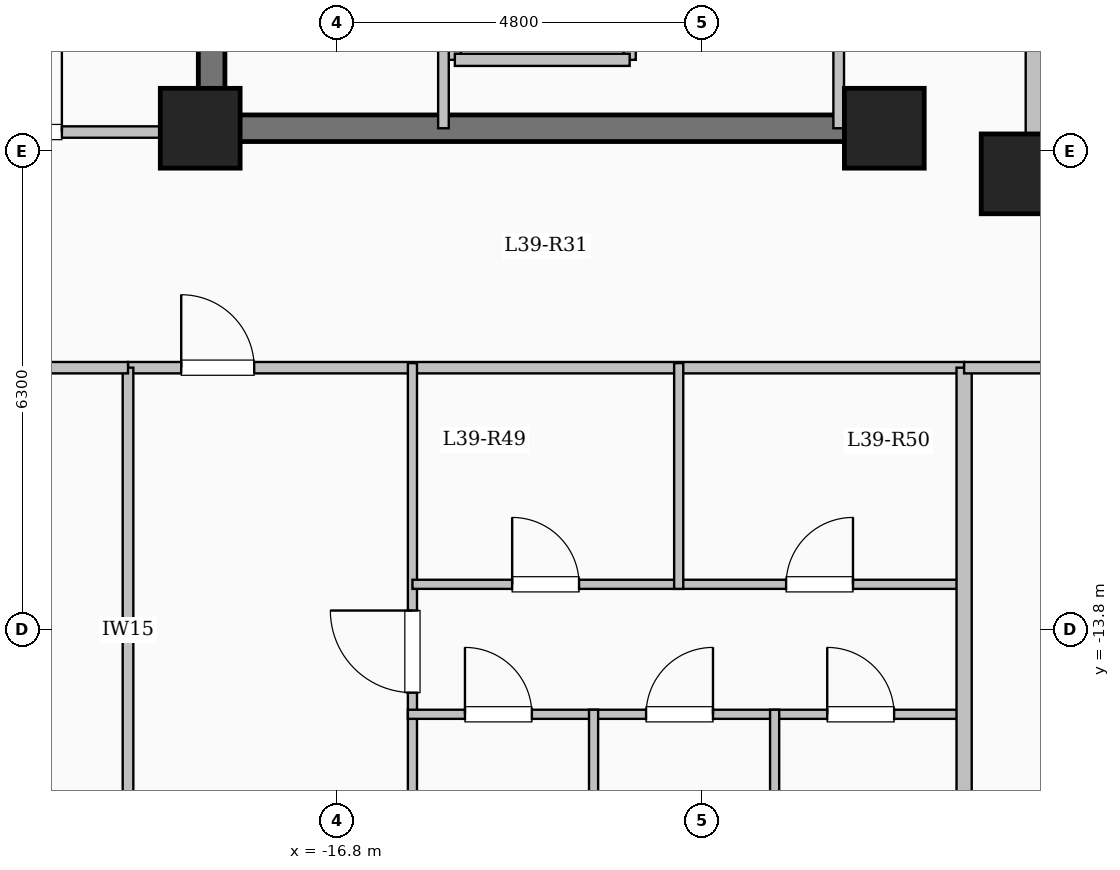
"""IFC4 building model, lengths in metres.
Left out: names, types, materials, properties, quantities, classifications, styles, units other than length and angle.
Written with IfcOpenShell. Run it as: python <this file> out.ifc"""

import sys

from ifc_helpers import new_model, si_unit, direction, frame, frame_2d, origin, origin_2d, place, context, subcontext, project, spatial, rectangle, extrude, element, fill, save


model = new_model("IFC4")
c1 = context("Model", 3, precision=1e-05, world=origin(), true_north=direction((0.0, 1.0)))
c2 = subcontext(c1, "Body", "Model", "MODEL_VIEW")
j1 = project(units=[si_unit("LENGTHUNIT", "METRE"), si_unit("PLANEANGLEUNIT", "RADIAN")], contexts=[c1])
p1 = place(None, origin())
s1 = spatial("IfcSite", under=j1, at=p1, CompositionType="ELEMENT")
p2 = place(p1, origin())
s2 = spatial("IfcBuilding", under=s1, at=p2, CompositionType="ELEMENT")
p3 = place(p2, frame((0.0, 0.0, 146.0)))
s3 = spatial("IfcBuildingStorey", under=s2, at=p3, CompositionType="ELEMENT", Elevation=146.0)
for number, where, z_axis, x_axis in (
    (1, (-7.8, -7.8, 0.0), (0.0, 0.0, 1.0), (1.0, 0.0, 0.0)),
    (2, (-9.6, -7.2, 0.0), (0.0, 0.0, 1.0), (1.0, 0.0, 0.0)),
    (3, (-18.6, -7.2, 0.0), (0.0, 0.0, 1.0), (1.0, 0.0, 0.0)),
):
    element("IfcColumn", number, at=place(p3, frame(where, z_axis=z_axis, x_axis=x_axis)), inside=s3, PredefinedType="COLUMN", context=c2, shape_type="SweptSolid", body=[
        extrude(rectangle(XDim=1.05, YDim=1.05, at=origin_2d()), origin(), (0.0, 0.0, 1.0), 3.35),
    ])
p4 = place(p3, frame((-7.62, -7.62, 0.0), z_axis=(0.0, 0.0, 1.0), x_axis=(1.0, 0.0, 0.0)))
e4 = element("IfcWall", 4, at=p4, inside=s3, PredefinedType="SOLIDWALL", context=c2, shape_type="SweptSolid", body=[
    extrude(rectangle(XDim=15.24, YDim=0.24, at=frame_2d((7.62, 0.0))), origin(), (0.0, 0.0, 1.0), 3.1),
])
p5 = place(p4, frame((6.92, 0.0, 0.95)))
e5 = element("IfcOpeningElement", 5, at=p5, cuts=e4, PredefinedType="OPENING", context=c2, shape_type="SweptSolid", body=[
    extrude(rectangle(XDim=1.4, YDim=1.5, at=frame_2d((0.7, 0.75))), frame((0.0, 0.13, 0.0), z_axis=(0.0, -1.0, 0.0), x_axis=(1.0, 0.0, 0.0)), (0.0, 0.0, 1.0), 0.26),
])
p6 = place(p3, frame((-7.62, 7.62, 0.0), z_axis=(0.0, 0.0, 1.0), x_axis=(0.0, -1.0, 0.0)))
e6 = element("IfcWall", 6, at=p6, inside=s3, PredefinedType="SOLIDWALL", context=c2, shape_type="SweptSolid", body=[
    extrude(rectangle(XDim=15.24, YDim=0.24, at=frame_2d((7.62, 0.0))), origin(), (0.0, 0.0, 1.0), 3.1),
])
p7 = place(p6, frame((6.92, 0.0, 0.95)))
e7 = element("IfcOpeningElement", 7, at=p7, cuts=e6, PredefinedType="OPENING", context=c2, shape_type="SweptSolid", body=[
    extrude(rectangle(XDim=1.4, YDim=1.5, at=frame_2d((0.7, 0.75))), frame((0.0, 0.13, 0.0), z_axis=(0.0, -1.0, 0.0), x_axis=(1.0, 0.0, 0.0)), (0.0, 0.0, 1.0), 0.26),
])
for number, where, z_axis, x_axis in (
    (8, (-15.25, -6.3, 0.0), (0.0, 0.0, 1.0), (0.0, 1.0, 0.0)),
    (9, (-12.95, -6.3, 0.0), (0.0, 0.0, 1.0), (0.0, 1.0, 0.0)),
):
    element("IfcWall", number, at=place(p3, frame(where, z_axis=z_axis, x_axis=x_axis)), inside=s3, PredefinedType="SOLIDWALL", context=c2, shape_type="SweptSolid", body=[
        extrude(rectangle(XDim=2.6, YDim=0.16, at=frame_2d((1.3, 0.0))), origin(), (0.0, 0.0, 1.0), 3.1),
    ])
p8 = place(p3, frame((-15.25, -6.3, 0.0), z_axis=(0.0, 0.0, 1.0), x_axis=(1.0, 0.0, 0.0)))
e10 = element("IfcWall", 10, at=p8, inside=s3, PredefinedType="SOLIDWALL", context=c2, shape_type="SweptSolid", body=[
    extrude(rectangle(XDim=2.3, YDim=0.16, at=frame_2d((1.15, 0.0))), origin(), (0.0, 0.0, 1.0), 3.1),
])
p9 = place(p3, frame((-18.45, -7.375, 0.0), z_axis=(0.0, 0.0, 1.0), x_axis=(0.0, 1.0, 0.0)))
e11 = element("IfcWall", 11, at=p9, inside=s3, PredefinedType="SHEAR", context=c2, shape_type="SweptSolid", body=[
    extrude(rectangle(XDim=14.05, YDim=0.35, at=frame_2d((7.025, 0.0))), origin(), (0.0, 0.0, 1.0), 3.35),
])
p10 = place(p3, frame((-18.625, -7.2, 0.0), z_axis=(0.0, 0.0, 1.0), x_axis=(1.0, 0.0, 0.0)))
e12 = element("IfcWall", 12, at=p10, inside=s3, PredefinedType="SHEAR", context=c2, shape_type="SweptSolid", body=[
    extrude(rectangle(XDim=8.55, YDim=0.35, at=frame_2d((4.275, 0.0))), origin(), (0.0, 0.0, 1.0), 3.35),
])
p11 = place(p3, frame((-15.4, -7.2, 0.0), z_axis=(0.0, 0.0, 1.0), x_axis=(0.0, 1.0, 0.0)))
e13 = element("IfcWall", 13, at=p11, inside=s3, PredefinedType="PARTITIONING", context=c2, shape_type="SweptSolid", body=[
    extrude(rectangle(XDim=10.45, YDim=0.14, at=frame_2d((5.225, 0.0))), origin(), (0.0, 0.0, 1.0), 3.1),
])
p12 = place(p11, frame((9.25, 0.0, 0.0)))
e14 = element("IfcOpeningElement", 14, at=p12, cuts=e13, PredefinedType="OPENING", context=c2, shape_type="SweptSolid", body=[
    extrude(rectangle(XDim=0.9, YDim=2.08, at=frame_2d((0.45, 1.04))), frame((0.0, 0.08, 0.0), z_axis=(0.0, -1.0, 0.0), x_axis=(1.0, 0.0, 0.0)), (0.0, 0.0, 1.0), 0.16),
])
p13 = place(p3, frame((-10.2, -7.2, 0.0), z_axis=(0.0, 0.0, 1.0), x_axis=(0.0, 1.0, 0.0)))
e15 = element("IfcWall", 15, at=p13, inside=s3, PredefinedType="PARTITIONING", context=c2, shape_type="SweptSolid", body=[
    extrude(rectangle(XDim=9.12, YDim=0.14, at=frame_2d((4.56, 0.0))), origin(), (0.0, 0.0, 1.0), 3.1),
])
p14 = place(p13, frame((1.9, 0.0, 0.0)))
e16 = element("IfcOpeningElement", 16, at=p14, cuts=e15, PredefinedType="OPENING", context=c2, shape_type="SweptSolid", body=[
    extrude(rectangle(XDim=0.95, YDim=2.12, at=frame_2d((0.475, 1.06))), frame((0.0, 0.08, 0.0), z_axis=(0.0, -1.0, 0.0), x_axis=(1.0, 0.0, 0.0)), (0.0, 0.0, 1.0), 0.16),
])
p15 = place(p13, frame((6.6, 0.0, 0.0)))
e17 = element("IfcOpeningElement", 17, at=p15, cuts=e15, PredefinedType="OPENING", context=c2, shape_type="SweptSolid", body=[
    extrude(rectangle(XDim=0.95, YDim=2.12, at=frame_2d((0.475, 1.06))), frame((0.0, 0.08, 0.0), z_axis=(0.0, -1.0, 0.0), x_axis=(1.0, 0.0, 0.0)), (0.0, 0.0, 1.0), 0.16),
])
p16 = place(p3, frame((-19.55, -10.35, 0.0), z_axis=(0.0, 0.0, 1.0), x_axis=(1.0, 0.0, 0.0)))
e18 = element("IfcWall", 18, at=p16, inside=s3, PredefinedType="PARTITIONING", context=c2, shape_type="SweptSolid", body=[
    extrude(rectangle(XDim=11.0, YDim=0.15, at=frame_2d((5.5, 0.0))), origin(), (0.0, 0.0, 1.0), 3.1),
])
p17 = place(p16, frame((0.7, 0.0, 0.0)))
e19 = element("IfcOpeningElement", 19, at=p17, cuts=e18, PredefinedType="OPENING", context=c2, shape_type="SweptSolid", body=[
    extrude(rectangle(XDim=0.96, YDim=2.15, at=frame_2d((0.48, 1.075))), frame((0.0, 0.085, 0.0), z_axis=(0.0, -1.0, 0.0), x_axis=(1.0, 0.0, 0.0)), (0.0, 0.0, 1.0), 0.17),
])
p18 = place(p3, frame((-15.808, -21.2, 0.0), z_axis=(0.0, 0.0, 1.0), x_axis=(0.0, 1.0, 0.0)))
e20 = element("IfcWall", 20, at=p18, inside=s3, PredefinedType="PARTITIONING", context=c2, shape_type="SweptSolid", body=[
    extrude(rectangle(XDim=10.91, YDim=0.12, at=frame_2d((5.455, 0.0))), origin(), (0.0, 0.0, 1.0), 3.1),
])
p19 = place(p18, frame((6.575, 0.0, 0.0)))
e21 = element("IfcOpeningElement", 21, at=p19, cuts=e20, PredefinedType="OPENING", context=c2, shape_type="SweptSolid", body=[
    extrude(rectangle(XDim=1.08, YDim=2.15, at=frame_2d((0.54, 1.075))), frame((0.0, 0.07, 0.0), z_axis=(0.0, -1.0, 0.0), x_axis=(1.0, 0.0, 0.0)), (0.0, 0.0, 1.0), 0.14),
])
p20 = place(p3, frame((-15.808, -13.2, 0.0), z_axis=(0.0, 0.0, 1.0), x_axis=(1.0, 0.0, 0.0)))
e22 = element("IfcWall", 22, at=p20, inside=s3, PredefinedType="PARTITIONING", context=c2, shape_type="SweptSolid", body=[
    extrude(rectangle(XDim=3.503, YDim=0.12, at=frame_2d((1.751, 0.0))), origin(), (0.0, 0.0, 1.0), 3.1),
])
p21 = place(p20, frame((1.312, 0.0, 0.0)))
e23 = element("IfcOpeningElement", 23, at=p21, cuts=e22, PredefinedType="OPENING", context=c2, shape_type="SweptSolid", body=[
    extrude(rectangle(XDim=0.88, YDim=2.1, at=frame_2d((0.44, 1.05))), frame((0.0, 0.07, 0.0), z_axis=(0.0, -1.0, 0.0), x_axis=(1.0, 0.0, 0.0)), (0.0, 0.0, 1.0), 0.14),
])
p22 = place(p3, frame((-12.305, -13.2, 0.0), z_axis=(0.0, 0.0, 1.0), x_axis=(1.0, 0.0, 0.0)))
e24 = element("IfcWall", 24, at=p22, inside=s3, PredefinedType="PARTITIONING", context=c2, shape_type="SweptSolid", body=[
    extrude(rectangle(XDim=3.705, YDim=0.12, at=frame_2d((1.853, 0.0))), origin(), (0.0, 0.0, 1.0), 3.1),
])
p23 = place(p22, frame((1.413, 0.0, 0.0)))
e25 = element("IfcOpeningElement", 25, at=p23, cuts=e24, PredefinedType="OPENING", context=c2, shape_type="SweptSolid", body=[
    extrude(rectangle(XDim=0.88, YDim=2.1, at=frame_2d((0.44, 1.05))), frame((0.0, 0.07, 0.0), z_axis=(0.0, -1.0, 0.0), x_axis=(1.0, 0.0, 0.0)), (0.0, 0.0, 1.0), 0.14),
])
p24 = place(p3, frame((-15.868, -14.91, 0.0), z_axis=(0.0, 0.0, 1.0), x_axis=(1.0, 0.0, 0.0)))
e26 = element("IfcWall", 26, at=p24, inside=s3, PredefinedType="PARTITIONING", context=c2, shape_type="SweptSolid", body=[
    extrude(rectangle(XDim=7.328, YDim=0.12, at=frame_2d((3.664, 0.0))), origin(), (0.0, 0.0, 1.0), 3.1),
])
p25 = place(p24, frame((0.751, 0.0, 0.0)))
e27 = element("IfcOpeningElement", 27, at=p25, cuts=e26, PredefinedType="OPENING", context=c2, shape_type="SweptSolid", body=[
    extrude(rectangle(XDim=0.88, YDim=2.1, at=frame_2d((0.44, 1.05))), frame((0.0, 0.07, 0.0), z_axis=(0.0, -1.0, 0.0), x_axis=(1.0, 0.0, 0.0)), (0.0, 0.0, 1.0), 0.14),
])
p26 = place(p24, frame((3.134, 0.0, 0.0)))
e28 = element("IfcOpeningElement", 28, at=p26, cuts=e26, PredefinedType="OPENING", context=c2, shape_type="SweptSolid", body=[
    extrude(rectangle(XDim=0.88, YDim=2.1, at=frame_2d((0.44, 1.05))), frame((0.0, 0.07, 0.0), z_axis=(0.0, -1.0, 0.0), x_axis=(1.0, 0.0, 0.0)), (0.0, 0.0, 1.0), 0.14),
])
p27 = place(p24, frame((5.517, 0.0, 0.0)))
e29 = element("IfcOpeningElement", 29, at=p27, cuts=e26, PredefinedType="OPENING", context=c2, shape_type="SweptSolid", body=[
    extrude(rectangle(XDim=0.88, YDim=2.1, at=frame_2d((0.44, 1.05))), frame((0.0, 0.07, 0.0), z_axis=(0.0, -1.0, 0.0), x_axis=(1.0, 0.0, 0.0)), (0.0, 0.0, 1.0), 0.14),
])
p28 = place(p3, frame((-12.305, -13.26, 0.0), z_axis=(0.0, 0.0, 1.0), x_axis=(0.0, 1.0, 0.0)))
e30 = element("IfcWall", 30, at=p28, inside=s3, PredefinedType="PARTITIONING", context=c2, shape_type="SweptSolid", body=[
    extrude(rectangle(XDim=2.97, YDim=0.12, at=frame_2d((1.485, 0.0))), origin(), (0.0, 0.0, 1.0), 3.1),
])
for number, where, z_axis, x_axis in (
    (31, (-13.425, -21.2, 0.0), (0.0, 0.0, 1.0), (0.0, 1.0, 0.0)),
    (32, (-11.043, -21.2, 0.0), (0.0, 0.0, 1.0), (0.0, 1.0, 0.0)),
):
    element("IfcWall", number, at=place(p3, frame(where, z_axis=z_axis, x_axis=x_axis)), inside=s3, PredefinedType="PARTITIONING", context=c2, shape_type="SweptSolid", body=[
        extrude(rectangle(XDim=6.35, YDim=0.12, at=frame_2d((3.175, 0.0))), origin(), (0.0, 0.0, 1.0), 3.1),
    ])
p29 = place(p3, frame((-8.55, -21.804, 0.0), z_axis=(0.0, 0.0, 1.0), x_axis=(0.0, 1.0, 0.0)))
e33 = element("IfcWall", 33, at=p29, inside=s3, PredefinedType="SOLIDWALL", context=c2, shape_type="SweptSolid", body=[
    extrude(rectangle(XDim=11.454, YDim=0.2, at=frame_2d((5.727, 0.0))), origin(), (0.0, 0.0, 1.0), 3.1),
])
p30 = place(p3, frame((-8.55, -10.35, 0.0), z_axis=(0.0, 0.0, 1.0), x_axis=(1.0, 0.0, 0.0)))
e34 = element("IfcWall", 34, at=p30, inside=s3, PredefinedType="PARTITIONING", context=c2, shape_type="SweptSolid", body=[
    extrude(rectangle(XDim=17.1, YDim=0.15, at=frame_2d((8.55, 0.0))), origin(), (0.0, 0.0, 1.0), 3.1),
])
p31 = place(p30, frame((1.6, 0.0, 0.0)))
e35 = element("IfcOpeningElement", 35, at=p31, cuts=e34, PredefinedType="OPENING", context=c2, shape_type="SweptSolid", body=[
    extrude(rectangle(XDim=0.96, YDim=2.15, at=frame_2d((0.48, 1.075))), frame((0.0, 0.085, 0.0), z_axis=(0.0, -1.0, 0.0), x_axis=(1.0, 0.0, 0.0)), (0.0, 0.0, 1.0), 0.17),
])
p32 = place(p3, frame((-25.08, -7.25, 0.0), z_axis=(0.0, 0.0, 1.0), x_axis=(1.0, 0.0, 0.0)))
e36 = element("IfcWall", 36, at=p32, inside=s3, PredefinedType="PARTITIONING", context=c2, shape_type="SweptSolid", body=[
    extrude(rectangle(XDim=6.63, YDim=0.15, at=frame_2d((3.315, 0.0))), origin(), (0.0, 0.0, 1.0), 3.1),
])
p33 = place(p32, frame((3.58, 0.0, 0.0)))
e37 = element("IfcOpeningElement", 37, at=p33, cuts=e36, PredefinedType="OPENING", context=c2, shape_type="SweptSolid", body=[
    extrude(rectangle(XDim=1.08, YDim=2.15, at=frame_2d((0.54, 1.075))), frame((0.0, 0.085, 0.0), z_axis=(0.0, -1.0, 0.0), x_axis=(1.0, 0.0, 0.0)), (0.0, 0.0, 1.0), 0.17),
])
p34 = place(p3, frame((-19.55, -17.25, 0.0), z_axis=(0.0, 0.0, 1.0), x_axis=(0.0, 1.0, 0.0)))
e38 = element("IfcWall", 38, at=p34, inside=s3, PredefinedType="PARTITIONING", context=c2, shape_type="SweptSolid", body=[
    extrude(rectangle(XDim=6.9, YDim=0.14, at=frame_2d((3.45, 0.0))), origin(), (0.0, 0.0, 1.0), 3.1),
])
p35 = place(p3, frame((-25.08, -10.35, 0.0), z_axis=(0.0, 0.0, 1.0), x_axis=(1.0, 0.0, 0.0)))
e39 = element("IfcWall", 39, at=p35, inside=s3, PredefinedType="PARTITIONING", context=c2, shape_type="SweptSolid", body=[
    extrude(rectangle(XDim=5.53, YDim=0.15, at=frame_2d((2.765, 0.0))), origin(), (0.0, 0.0, 1.0), 3.1),
])
p36 = place(p35, frame((2.29, 0.0, 0.0)))
e40 = element("IfcOpeningElement", 40, at=p36, cuts=e39, PredefinedType="OPENING", context=c2, shape_type="SweptSolid", body=[
    extrude(rectangle(XDim=0.95, YDim=2.15, at=frame_2d((0.475, 1.075))), frame((0.0, 0.085, 0.0), z_axis=(0.0, -1.0, 0.0), x_axis=(1.0, 0.0, 0.0)), (0.0, 0.0, 1.0), 0.17),
])
p37 = place(p17, origin())
e41 = element("IfcDoor", 41, at=p37, inside=s3, OperationType="SINGLE_SWING_LEFT", PredefinedType="DOOR", context=c2, shape_type="SweptSolid", body=[
    extrude(rectangle(XDim=0.96, YDim=2.15, at=frame_2d((0.48, 1.075))), frame((0.0, 0.025, 0.0), z_axis=(0.0, -1.0, 0.0), x_axis=(1.0, 0.0, 0.0)), (0.0, 0.0, 1.0), 0.05),
])
fill(e19, e41)
p38 = place(p19, origin())
e42 = element("IfcDoor", 42, at=p38, inside=s3, OperationType="SINGLE_SWING_RIGHT", PredefinedType="DOOR", context=c2, shape_type="SweptSolid", body=[
    extrude(rectangle(XDim=1.08, YDim=2.15, at=frame_2d((0.54, 1.075))), frame((0.0, 0.025, 0.0), z_axis=(0.0, -1.0, 0.0), x_axis=(1.0, 0.0, 0.0)), (0.0, 0.0, 1.0), 0.05),
])
fill(e21, e42)
p39 = place(p21, origin())
e43 = element("IfcDoor", 43, at=p39, inside=s3, OperationType="SINGLE_SWING_LEFT", PredefinedType="DOOR", context=c2, shape_type="SweptSolid", body=[
    extrude(rectangle(XDim=0.88, YDim=2.1, at=frame_2d((0.44, 1.05))), frame((0.0, 0.025, 0.0), z_axis=(0.0, -1.0, 0.0), x_axis=(1.0, 0.0, 0.0)), (0.0, 0.0, 1.0), 0.05),
])
fill(e23, e43)
p40 = place(p23, origin())
e44 = element("IfcDoor", 44, at=p40, inside=s3, OperationType="SINGLE_SWING_RIGHT", PredefinedType="DOOR", context=c2, shape_type="SweptSolid", body=[
    extrude(rectangle(XDim=0.88, YDim=2.1, at=frame_2d((0.44, 1.05))), frame((0.0, 0.025, 0.0), z_axis=(0.0, -1.0, 0.0), x_axis=(1.0, 0.0, 0.0)), (0.0, 0.0, 1.0), 0.05),
])
fill(e25, e44)
p41 = place(p25, origin())
e45 = element("IfcDoor", 45, at=p41, inside=s3, OperationType="SINGLE_SWING_LEFT", PredefinedType="DOOR", context=c2, shape_type="SweptSolid", body=[
    extrude(rectangle(XDim=0.88, YDim=2.1, at=frame_2d((0.44, 1.05))), frame((0.0, 0.025, 0.0), z_axis=(0.0, -1.0, 0.0), x_axis=(1.0, 0.0, 0.0)), (0.0, 0.0, 1.0), 0.05),
])
fill(e27, e45)
p42 = place(p26, origin())
e46 = element("IfcDoor", 46, at=p42, inside=s3, OperationType="SINGLE_SWING_RIGHT", PredefinedType="DOOR", context=c2, shape_type="SweptSolid", body=[
    extrude(rectangle(XDim=0.88, YDim=2.1, at=frame_2d((0.44, 1.05))), frame((0.0, 0.025, 0.0), z_axis=(0.0, -1.0, 0.0), x_axis=(1.0, 0.0, 0.0)), (0.0, 0.0, 1.0), 0.05),
])
fill(e28, e46)
p43 = place(p27, origin())
e47 = element("IfcDoor", 47, at=p43, inside=s3, OperationType="SINGLE_SWING_LEFT", PredefinedType="DOOR", context=c2, shape_type="SweptSolid", body=[
    extrude(rectangle(XDim=0.88, YDim=2.1, at=frame_2d((0.44, 1.05))), frame((0.0, 0.025, 0.0), z_axis=(0.0, -1.0, 0.0), x_axis=(1.0, 0.0, 0.0)), (0.0, 0.0, 1.0), 0.05),
])
fill(e29, e47)
p44 = place(p33, origin())
e48 = element("IfcDoor", 48, at=p44, inside=s3, OperationType="SINGLE_SWING_RIGHT", PredefinedType="DOOR", context=c2, shape_type="SweptSolid", body=[
    extrude(rectangle(XDim=1.08, YDim=2.15, at=frame_2d((0.54, 1.075))), frame((0.0, 0.025, 0.0), z_axis=(0.0, -1.0, 0.0), x_axis=(1.0, 0.0, 0.0)), (0.0, 0.0, 1.0), 0.05),
])
fill(e37, e48)
save(model, sys.argv[1])
